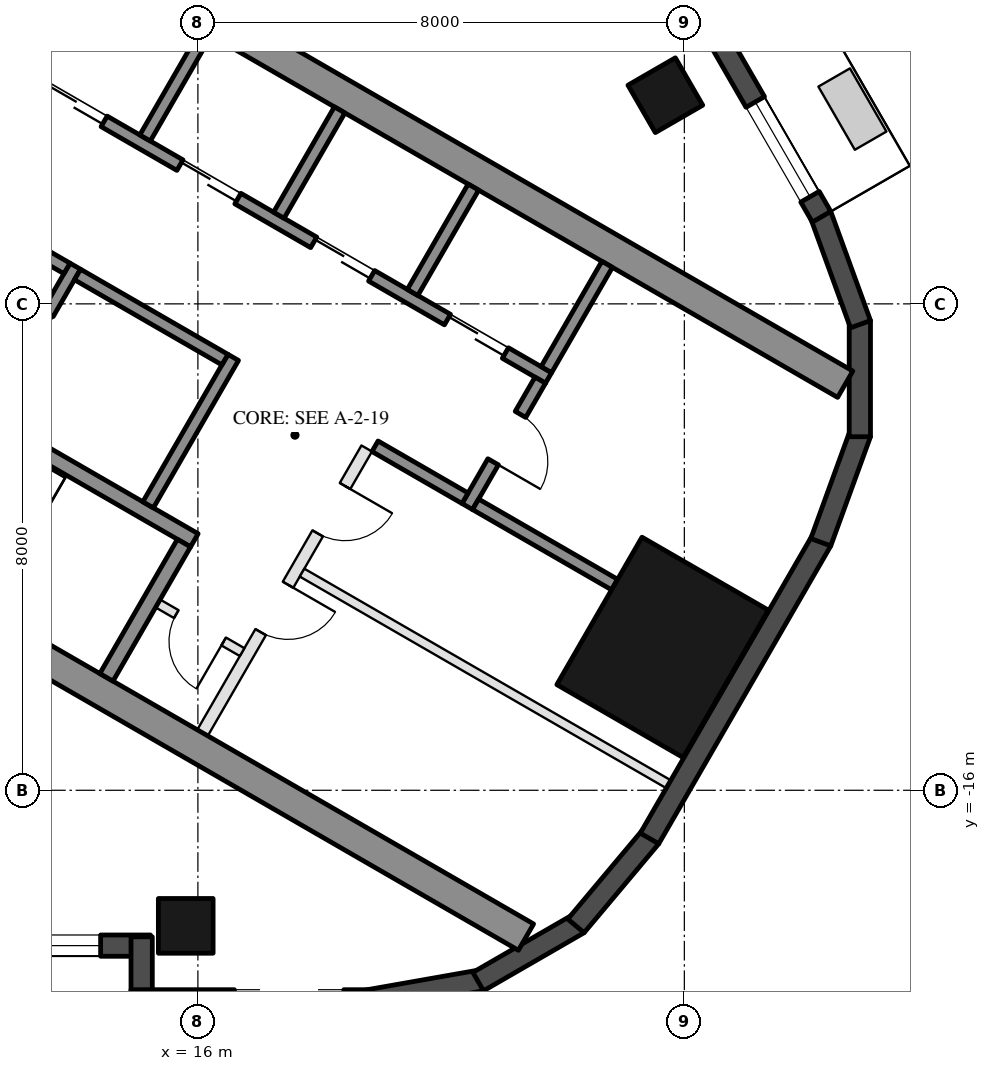
"""IFC4 building model, lengths in metres.
Left out: names, types, materials, properties, quantities, classifications, styles, units other than length and angle.
Written with IfcOpenShell. Run it as: python <this file> out.ifc"""

import sys

from ifc_helpers import new_model, si_unit, direction, frame, frame_2d, origin, origin_2d, place, context, subcontext, project, spatial, rectangle, hollow_rectangle, extrude, element, fill, save


model = new_model("IFC4")
c1 = context("Model", 3, precision=1e-05, world=origin(), true_north=direction((0.0, 1.0)))
c2 = subcontext(c1, "Body", "Model", "MODEL_VIEW")
j1 = project(units=[si_unit("LENGTHUNIT", "METRE"), si_unit("PLANEANGLEUNIT", "RADIAN")], contexts=[c1])
p1 = place(None, origin())
s1 = spatial("IfcSite", under=j1, at=p1, CompositionType="ELEMENT")
p2 = place(p1, origin())
s2 = spatial("IfcBuilding", under=s1, at=p2, CompositionType="ELEMENT")
p3 = place(p2, frame((0.0, 0.0, 90.9)))
s3 = spatial("IfcBuildingStorey", under=s2, at=p3, CompositionType="ELEMENT", Elevation=90.9)
for number, where, z_axis, x_axis in (
    (1, (15.8, -18.23, 0.0), (0.0, 0.0, 1.0), (-1.0, 0.0, 0.0)),
    (2, (23.688, -4.568, 0.0), (0.0, 0.0, 1.0), (-0.5, 0.866, 0.0)),
):
    element("IfcColumn", number, at=place(p3, frame(where, z_axis=z_axis, x_axis=x_axis)), inside=s3, PredefinedType="COLUMN", context=c2, shape_type="SweptSolid", body=[
        extrude(hollow_rectangle(XDim=0.9, YDim=0.9, WallThickness=0.04, at=origin_2d()), origin(), (0.0, 0.0, 1.0), 3.7),
    ])
p4 = place(p3, frame((23.643, -13.65, 0.0), z_axis=(0.0, 0.0, 1.0), x_axis=(0.5, 0.866025403784, 0.0)))
e3 = element("IfcColumn", 3, at=p4, inside=s3, PredefinedType="COLUMN", context=c2, shape_type="SweptSolid", body=[
    extrude(hollow_rectangle(XDim=2.8, YDim=2.4, WallThickness=0.07, at=origin_2d()), origin(), (0.0, 0.0, 1.0), 3.7),
])
p5 = place(p3, frame((8.48, -18.555, 0.0), z_axis=(0.0, 0.0, 1.0), x_axis=(1.0, 0.0, 0.0)))
e4 = element("IfcWall", 4, at=p5, inside=s3, PredefinedType="SOLIDWALL", context=c2, shape_type="SweptSolid", body=[
    extrude(rectangle(XDim=6.74, YDim=0.35, at=frame_2d((3.37, 0.0))), origin(), (0.0, 0.0, 1.0), 3.55),
])
p6 = place(p5, frame((0.32, 0.0, 0.0)))
e5 = element("IfcOpeningElement", 5, at=p6, cuts=e4, PredefinedType="OPENING", context=c2, shape_type="SweptSolid", body=[
    extrude(rectangle(XDim=2.4, YDim=2.4, at=frame_2d((1.2, 1.2))), frame((0.0, 0.185, 0.0), z_axis=(0.0, -1.0, 0.0), x_axis=(1.0, 0.0, 0.0)), (0.0, 0.0, 1.0), 0.37),
])
p7 = place(p5, frame((3.02, 0.0, 0.3)))
e6 = element("IfcOpeningElement", 6, at=p7, cuts=e4, PredefinedType="OPENING", context=c2, shape_type="SweptSolid", body=[
    extrude(rectangle(XDim=2.9, YDim=2.65, at=frame_2d((1.45, 1.325))), frame((0.0, 0.185, 0.0), z_axis=(0.0, -1.0, 0.0), x_axis=(1.0, 0.0, 0.0)), (0.0, 0.0, 1.0), 0.37),
])
p8 = place(p3, frame((15.075, -18.41, 0.0), z_axis=(0.0, 0.0, 1.0), x_axis=(0.0, -1.0, 0.0)))
e7 = element("IfcWall", 7, at=p8, inside=s3, PredefinedType="SOLIDWALL", context=c2, shape_type="SweptSolid", body=[
    extrude(rectangle(XDim=1.22, YDim=0.35, at=frame_2d((0.61, 0.0))), origin(), (0.0, 0.0, 1.0), 3.55),
])
p9 = place(p3, frame((14.9, -19.455, 0.0), z_axis=(0.0, 0.0, 1.0), x_axis=(1.0, 0.0, 0.0)))
e8 = element("IfcWall", 8, at=p9, inside=s3, PredefinedType="SOLIDWALL", context=c2, shape_type="SweptSolid", body=[
    extrude(rectangle(XDim=3.916, YDim=0.35, at=frame_2d((1.958, 0.0))), origin(), (0.0, 0.0, 1.0), 3.55),
])
p10 = place(p9, frame((1.7, 0.0, 0.3)))
e9 = element("IfcOpeningElement", 9, at=p10, cuts=e8, PredefinedType="OPENING", context=c2, shape_type="SweptSolid", body=[
    extrude(rectangle(XDim=1.8, YDim=2.65, at=frame_2d((0.9, 1.325))), frame((0.0, 0.185, 0.0), z_axis=(0.0, -1.0, 0.0), x_axis=(1.0, 0.0, 0.0)), (0.0, 0.0, 1.0), 0.37),
])
p11 = place(p3, frame((18.785, -19.458, 0.0), z_axis=(0.0, 0.0, 1.0), x_axis=(0.984798995425, 0.173697837091, 0.0)))
e10 = element("IfcWall", 10, at=p11, inside=s3, PredefinedType="SOLIDWALL", context=c2, shape_type="SweptSolid", body=[
    extrude(rectangle(XDim=1.91, YDim=0.35, at=frame_2d((0.955, 0.0))), origin(), (0.0, 0.0, 1.0), 3.55),
])
for number, where, z_axis, x_axis in (
    (11, (20.61, -19.147, 0.0), (0.0, 0.0, 1.0), (0.866, 0.5, 0.0)),
    (12, (22.217, -18.231, 0.0), (0.0, 0.0, 1.0), (0.643, 0.766, 0.0)),
):
    element("IfcWall", number, at=place(p3, frame(where, z_axis=z_axis, x_axis=x_axis)), inside=s3, PredefinedType="SOLIDWALL", context=c2, shape_type="SweptSolid", body=[
        extrude(rectangle(XDim=1.91, YDim=0.35, at=frame_2d((0.955, 0.0))), origin(), (0.0, 0.0, 1.0), 3.55),
    ])
p12 = place(p3, frame((23.427, -16.792, 0.0), z_axis=(0.0, 0.0, 1.0), x_axis=(0.500018773155, 0.866014564827, 0.0)))
e13 = element("IfcWall", 13, at=p12, inside=s3, PredefinedType="SOLIDWALL", context=c2, shape_type="SweptSolid", body=[
    extrude(rectangle(XDim=5.658, YDim=0.35, at=frame_2d((2.829, 0.0))), origin(), (0.0, 0.0, 1.0), 3.55),
])
for number, where, z_axis, x_axis in (
    (14, (26.244, -11.92, 0.0), (0.0, 0.0, 1.0), (0.342, 0.94, 0.0)),
    (15, (26.886, -10.185, 0.0), (0.0, 0.0, 1.0), (0.0, 1.0, 0.0)),
    (16, (26.897, -8.335, 0.0), (0.0, 0.0, 1.0), (-0.342, 0.94, 0.0)),
):
    element("IfcWall", number, at=place(p3, frame(where, z_axis=z_axis, x_axis=x_axis)), inside=s3, PredefinedType="SOLIDWALL", context=c2, shape_type="SweptSolid", body=[
        extrude(rectangle(XDim=1.91, YDim=0.35, at=frame_2d((0.955, 0.0))), origin(), (0.0, 0.0, 1.0), 3.55),
    ])
p13 = place(p3, frame((26.257, -6.567, 0.0), z_axis=(0.0, 0.0, 1.0), x_axis=(-0.500023526245, 0.866011820475, 0.0)))
e17 = element("IfcWall", 17, at=p13, inside=s3, PredefinedType="SOLIDWALL", context=c2, shape_type="SweptSolid", body=[
    extrude(rectangle(XDim=11.816, YDim=0.35, at=frame_2d((5.908, 0.0))), origin(), (0.0, 0.0, 1.0), 3.55),
])
p14 = place(p13, frame((0.38, 0.0, 0.3)))
e18 = element("IfcOpeningElement", 18, at=p14, cuts=e17, PredefinedType="OPENING", context=c2, shape_type="SweptSolid", body=[
    extrude(rectangle(XDim=1.8, YDim=2.65, at=frame_2d((0.9, 1.325))), frame((0.0, 0.185, 0.0), z_axis=(0.0, -1.0, 0.0), x_axis=(1.0, 0.0, 0.0)), (0.0, 0.0, 1.0), 0.37),
])
p15 = place(p13, frame((7.716, 0.0, 0.0)))
e19 = element("IfcOpeningElement", 19, at=p15, cuts=e17, PredefinedType="OPENING", context=c2, shape_type="SweptSolid", body=[
    extrude(rectangle(XDim=2.4, YDim=2.4, at=frame_2d((1.2, 1.2))), frame((0.0, 0.185, 0.0), z_axis=(0.0, -1.0, 0.0), x_axis=(1.0, 0.0, 0.0)), (0.0, 0.0, 1.0), 0.37),
])
p16 = place(p13, frame((3.816, 0.0, 0.3)))
e20 = element("IfcOpeningElement", 20, at=p16, cuts=e17, PredefinedType="OPENING", context=c2, shape_type="SweptSolid", body=[
    extrude(rectangle(XDim=1.6, YDim=2.65, at=frame_2d((0.8, 1.325))), frame((0.0, 0.185, 0.0), z_axis=(0.0, -1.0, 0.0), x_axis=(1.0, 0.0, 0.0)), (0.0, 0.0, 1.0), 0.37),
])
p17 = place(p13, frame((5.716, 0.0, 0.3)))
e21 = element("IfcOpeningElement", 21, at=p17, cuts=e17, PredefinedType="OPENING", context=c2, shape_type="SweptSolid", body=[
    extrude(rectangle(XDim=1.6, YDim=2.65, at=frame_2d((0.8, 1.325))), frame((0.0, 0.185, 0.0), z_axis=(0.0, -1.0, 0.0), x_axis=(1.0, 0.0, 0.0)), (0.0, 0.0, 1.0), 0.37),
])
for number, where, z_axis, x_axis in (
    (22, (8.547, -10.997, 0.0), (0.0, 0.0, 1.0), (0.866, -0.5, 0.0)),
    (23, (13.797, -1.903, 0.0), (0.0, 0.0, 1.0), (0.866, -0.5, 0.0)),
):
    element("IfcWall", number, at=place(p3, frame(where, z_axis=z_axis, x_axis=x_axis)), inside=s3, PredefinedType="SHEAR", context=c2, shape_type="SweptSolid", body=[
        extrude(rectangle(XDim=14.837, YDim=0.5, at=frame_2d((7.418, 0.0))), origin(), (0.0, 0.0, 1.0), 3.5),
    ])
p18 = place(p3, frame((8.845, -10.88, 0.0), z_axis=(0.0, 0.0, 1.0), x_axis=(0.500004234368, 0.866022959057, 0.0)))
e24 = element("IfcWall", 24, at=p18, inside=s3, PredefinedType="SHEAR", context=c2, shape_type="SweptSolid", body=[
    extrude(rectangle(XDim=10.0, YDim=0.4, at=frame_2d((5.0, 0.0))), origin(), (0.0, 0.0, 1.0), 3.5),
])
p19 = place(p18, frame((3.55, 0.0, 0.0)))
e25 = element("IfcOpeningElement", 25, at=p19, cuts=e24, PredefinedType="OPENING", context=c2, shape_type="SweptSolid", body=[
    extrude(rectangle(XDim=1.1, YDim=2.1, at=frame_2d((0.55, 1.05))), frame((0.0, 0.21, 0.0), z_axis=(0.0, -1.0, 0.0), x_axis=(1.0, 0.0, 0.0)), (0.0, 0.0, 1.0), 0.42),
])
p20 = place(p18, frame((5.85, 0.0, 0.0)))
e26 = element("IfcOpeningElement", 26, at=p20, cuts=e24, PredefinedType="OPENING", context=c2, shape_type="SweptSolid", body=[
    extrude(rectangle(XDim=1.4, YDim=2.1, at=frame_2d((0.7, 1.05))), frame((0.0, 0.21, 0.0), z_axis=(0.0, -1.0, 0.0), x_axis=(1.0, 0.0, 0.0)), (0.0, 0.0, 1.0), 0.42),
])
p21 = place(p3, frame((10.356, -8.664, 0.0), z_axis=(0.0, 0.0, 1.0), x_axis=(0.866028629588, -0.499994412703, 0.0)))
e27 = element("IfcWall", 27, at=p21, inside=s3, PredefinedType="SHEAR", context=c2, shape_type="SweptSolid", body=[
    extrude(rectangle(XDim=6.45, YDim=0.25, at=frame_2d((3.225, 0.0))), origin(), (0.0, 0.0, 1.0), 3.5),
])
p22 = place(p21, frame((0.3, 0.0, 0.0)))
e28 = element("IfcOpeningElement", 28, at=p22, cuts=e27, PredefinedType="OPENING", context=c2, shape_type="SweptSolid", body=[
    extrude(rectangle(XDim=1.0, YDim=2.1, at=frame_2d((0.5, 1.05))), frame((0.0, 0.135, 0.0), z_axis=(0.0, -1.0, 0.0), x_axis=(1.0, 0.0, 0.0)), (0.0, 0.0, 1.0), 0.27),
])
p23 = place(p3, frame((14.496, -14.143, 0.0), z_axis=(0.0, 0.0, 1.0), x_axis=(0.500062241894, 0.865989465428, 0.0)))
e29 = element("IfcWall", 29, at=p23, inside=s3, PredefinedType="SHEAR", context=c2, shape_type="SweptSolid", body=[
    extrude(rectangle(XDim=2.55, YDim=0.25, at=frame_2d((1.275, 0.0))), origin(), (0.0, 0.0, 1.0), 3.5),
])
p24 = place(p3, frame((15.181, -11.305, 0.0), z_axis=(0.0, 0.0, 1.0), x_axis=(0.49994636267, 0.866056369097, 0.0)))
e30 = element("IfcWall", 30, at=p24, inside=s3, PredefinedType="SHEAR", context=c2, shape_type="SweptSolid", body=[
    extrude(rectangle(XDim=2.8, YDim=0.2, at=frame_2d((1.4, 0.0))), origin(), (0.0, 0.0, 1.0), 3.5),
])
p25 = place(p3, frame((12.583, -9.805, 0.0), z_axis=(0.0, 0.0, 1.0), x_axis=(0.49994636267, 0.866056369097, 0.0)))
e31 = element("IfcWall", 31, at=p25, inside=s3, PredefinedType="SHEAR", context=c2, shape_type="SweptSolid", body=[
    extrude(rectangle(XDim=2.8, YDim=0.2, at=frame_2d((1.4, 0.0))), origin(), (0.0, 0.0, 1.0), 3.5),
])
p26 = place(p25, frame((0.7, 0.0, 0.0)))
e32 = element("IfcOpeningElement", 32, at=p26, cuts=e31, PredefinedType="OPENING", context=c2, shape_type="SweptSolid", body=[
    extrude(rectangle(XDim=1.2, YDim=2.1, at=frame_2d((0.6, 1.05))), frame((0.0, 0.11, 0.0), z_axis=(0.0, -1.0, 0.0), x_axis=(1.0, 0.0, 0.0)), (0.0, 0.0, 1.0), 0.22),
])
p27 = place(p3, frame((11.768, -6.217, 0.0), z_axis=(0.0, 0.0, 1.0), x_axis=(0.866050077142, -0.499957262057, 0.0)))
e33 = element("IfcWall", 33, at=p27, inside=s3, PredefinedType="SHEAR", context=c2, shape_type="SweptSolid", body=[
    extrude(rectangle(XDim=2.4, YDim=0.2, at=frame_2d((1.2, 0.0))), origin(), (0.0, 0.0, 1.0), 3.5),
])
p28 = place(p3, frame((14.02, -7.517, 0.0), z_axis=(0.0, 0.0, 1.0), x_axis=(0.866034573852, -0.49998411664, 0.0)))
e34 = element("IfcWall", 34, at=p28, inside=s3, PredefinedType="SHEAR", context=c2, shape_type="SweptSolid", body=[
    extrude(rectangle(XDim=2.8, YDim=0.2, at=frame_2d((1.4, 0.0))), origin(), (0.0, 0.0, 1.0), 3.5),
])
p29 = place(p3, frame((12.968, -4.138, 0.0), z_axis=(0.0, 0.0, 1.0), x_axis=(0.866028328073, -0.49999493495, 0.0)))
e35 = element("IfcWall", 35, at=p29, inside=s3, PredefinedType="SHEAR", context=c2, shape_type="SweptSolid", body=[
    extrude(rectangle(XDim=10.16, YDim=0.2, at=frame_2d((5.08, 0.0))), origin(), (0.0, 0.0, 1.0), 3.5),
])
p30 = place(p29, frame((0.62, 0.0, 0.0)))
e36 = element("IfcOpeningElement", 36, at=p30, cuts=e35, PredefinedType="OPENING", context=c2, shape_type="SweptSolid", body=[
    extrude(rectangle(XDim=1.1, YDim=2.1, at=frame_2d((0.55, 1.05))), frame((0.0, 0.11, 0.0), z_axis=(0.0, -1.0, 0.0), x_axis=(1.0, 0.0, 0.0)), (0.0, 0.0, 1.0), 0.22),
])
p31 = place(p29, frame((3.16, 0.0, 0.0)))
e37 = element("IfcOpeningElement", 37, at=p31, cuts=e35, PredefinedType="OPENING", context=c2, shape_type="SweptSolid", body=[
    extrude(rectangle(XDim=1.1, YDim=2.1, at=frame_2d((0.55, 1.05))), frame((0.0, 0.11, 0.0), z_axis=(0.0, -1.0, 0.0), x_axis=(1.0, 0.0, 0.0)), (0.0, 0.0, 1.0), 0.22),
])
p32 = place(p29, frame((5.7, 0.0, 0.0)))
e38 = element("IfcOpeningElement", 38, at=p32, cuts=e35, PredefinedType="OPENING", context=c2, shape_type="SweptSolid", body=[
    extrude(rectangle(XDim=1.1, YDim=2.1, at=frame_2d((0.55, 1.05))), frame((0.0, 0.11, 0.0), z_axis=(0.0, -1.0, 0.0), x_axis=(1.0, 0.0, 0.0)), (0.0, 0.0, 1.0), 0.22),
])
p33 = place(p29, frame((8.24, 0.0, 0.0)))
e39 = element("IfcOpeningElement", 39, at=p33, cuts=e35, PredefinedType="OPENING", context=c2, shape_type="SweptSolid", body=[
    extrude(rectangle(XDim=1.1, YDim=2.1, at=frame_2d((0.55, 1.05))), frame((0.0, 0.11, 0.0), z_axis=(0.0, -1.0, 0.0), x_axis=(1.0, 0.0, 0.0)), (0.0, 0.0, 1.0), 0.22),
])
p34 = place(p3, frame((20.43, -11.333, 0.0), z_axis=(0.0, 0.0, 1.0), x_axis=(0.500001309137, 0.866024647952, 0.0)))
e40 = element("IfcWall", 40, at=p34, inside=s3, PredefinedType="SHEAR", context=c2, shape_type="SweptSolid", body=[
    extrude(rectangle(XDim=2.4, YDim=0.2, at=frame_2d((1.2, 0.0))), origin(), (0.0, 0.0, 1.0), 3.5),
])
p35 = place(p34, frame((0.85, 0.0, 0.0)))
e41 = element("IfcOpeningElement", 41, at=p35, cuts=e40, PredefinedType="OPENING", context=c2, shape_type="SweptSolid", body=[
    extrude(rectangle(XDim=0.9, YDim=2.1, at=frame_2d((0.45, 1.05))), frame((0.0, 0.11, 0.0), z_axis=(0.0, -1.0, 0.0), x_axis=(1.0, 0.0, 0.0)), (0.0, 0.0, 1.0), 0.22),
])
p36 = place(p3, frame((18.913, -10.342, 0.0), z_axis=(0.0, 0.0, 1.0), x_axis=(0.866038183914, -0.499977863513, 0.0)))
e42 = element("IfcWall", 42, at=p36, inside=s3, PredefinedType="SHEAR", context=c2, shape_type="SweptSolid", body=[
    extrude(rectangle(XDim=1.71, YDim=0.2, at=frame_2d((0.855, 0.0))), origin(), (0.0, 0.0, 1.0), 3.5),
])
for number, where, z_axis, x_axis in (
    (43, (15.131, -5.272, 0.0), (0.0, 0.0, 1.0), (0.5, 0.866, 0.0)),
    (44, (17.331, -6.542, 0.0), (0.0, 0.0, 1.0), (0.5, 0.866, 0.0)),
    (45, (19.531, -7.812, 0.0), (0.0, 0.0, 1.0), (0.5, 0.866, 0.0)),
    (46, (21.73, -9.082, 0.0), (0.0, 0.0, 1.0), (0.5, 0.866, 0.0)),
):
    element("IfcWall", number, at=place(p3, frame(where, z_axis=z_axis, x_axis=x_axis)), inside=s3, PredefinedType="SHEAR", context=c2, shape_type="SweptSolid", body=[
        extrude(rectangle(XDim=2.0, YDim=0.2, at=frame_2d((1.0, 0.0))), origin(), (0.0, 0.0, 1.0), 3.5),
    ])
p37 = place(p3, frame((20.567, -11.297, 0.0), z_axis=(0.0, 0.0, 1.0), x_axis=(0.866060851709, -0.499938597367, 0.0)))
e47 = element("IfcWall", 47, at=p37, inside=s3, PredefinedType="SHEAR", context=c2, shape_type="SweptSolid", body=[
    extrude(rectangle(XDim=2.64, YDim=0.2, at=frame_2d((1.32, 0.0))), origin(), (0.0, 0.0, 1.0), 3.5),
])
p38 = place(p3, frame((16.076, -15.055, 0.0), z_axis=(0.0, 0.0, 1.0), x_axis=(0.499995103361, 0.866028230842, 0.0)))
e48 = element("IfcWall", 48, at=p38, inside=s3, PredefinedType="PARTITIONING", context=c2, shape_type="SweptSolid", body=[
    extrude(rectangle(XDim=5.4, YDim=0.2, at=frame_2d((2.7, 0.0))), origin(), (0.0, 0.0, 1.0), 3.5),
])
p39 = place(p38, frame((1.913, 0.0, 0.0)))
e49 = element("IfcOpeningElement", 49, at=p39, cuts=e48, PredefinedType="OPENING", context=c2, shape_type="SweptSolid", body=[
    extrude(rectangle(XDim=0.9, YDim=2.1, at=frame_2d((0.45, 1.05))), frame((0.0, 0.11, 0.0), z_axis=(0.0, -1.0, 0.0), x_axis=(1.0, 0.0, 0.0)), (0.0, 0.0, 1.0), 0.22),
])
p40 = place(p38, frame((3.788, 0.0, 0.0)))
e50 = element("IfcOpeningElement", 50, at=p40, cuts=e48, PredefinedType="OPENING", context=c2, shape_type="SweptSolid", body=[
    extrude(rectangle(XDim=0.9, YDim=2.1, at=frame_2d((0.45, 1.05))), frame((0.0, 0.11, 0.0), z_axis=(0.0, -1.0, 0.0), x_axis=(1.0, 0.0, 0.0)), (0.0, 0.0, 1.0), 0.22),
])
p41 = place(p3, frame((15.342, -12.928, 0.0), z_axis=(0.0, 0.0, 1.0), x_axis=(0.865989903783, -0.500061482766, 0.0)))
e51 = element("IfcWall", 51, at=p41, inside=s3, PredefinedType="PARTITIONING", context=c2, shape_type="SweptSolid", body=[
    extrude(rectangle(XDim=1.6, YDim=0.15, at=frame_2d((0.8, 0.0))), origin(), (0.0, 0.0, 1.0), 3.5),
])
p42 = place(p41, frame((0.35, 0.0, 0.0)))
e52 = element("IfcOpeningElement", 52, at=p42, cuts=e51, PredefinedType="OPENING", context=c2, shape_type="SweptSolid", body=[
    extrude(rectangle(XDim=0.9, YDim=2.1, at=frame_2d((0.45, 1.05))), frame((0.0, 0.085, 0.0), z_axis=(0.0, -1.0, 0.0), x_axis=(1.0, 0.0, 0.0)), (0.0, 0.0, 1.0), 0.17),
])
p43 = place(p3, frame((17.713, -12.42, 0.0), z_axis=(0.0, 0.0, 1.0), x_axis=(0.866016523273, -0.500015381182, 0.0)))
e53 = element("IfcWall", 53, at=p43, inside=s3, PredefinedType="PARTITIONING", context=c2, shape_type="SweptSolid", body=[
    extrude(rectangle(XDim=6.95, YDim=0.15, at=frame_2d((3.475, 0.0))), origin(), (0.0, 0.0, 1.0), 3.5),
])
p44 = place(p7, origin())
e54 = element("IfcWindow", 54, at=p44, inside=s3, PartitioningType="SINGLE_PANEL", PredefinedType="WINDOW", context=c2, shape_type="SweptSolid", body=[
    extrude(rectangle(XDim=2.9, YDim=2.65, at=frame_2d((1.45, 1.325))), frame((0.0, 0.03, 0.0), z_axis=(0.0, -1.0, 0.0), x_axis=(1.0, 0.0, 0.0)), (0.0, 0.0, 1.0), 0.06),
])
fill(e6, e54)
p45 = place(p14, origin())
e55 = element("IfcWindow", 55, at=p45, inside=s3, PartitioningType="SINGLE_PANEL", PredefinedType="WINDOW", context=c2, shape_type="SweptSolid", body=[
    extrude(rectangle(XDim=1.8, YDim=2.65, at=frame_2d((0.9, 1.325))), frame((0.0, 0.03, 0.0), z_axis=(0.0, -1.0, 0.0), x_axis=(1.0, 0.0, 0.0)), (0.0, 0.0, 1.0), 0.06),
])
fill(e18, e55)
p46 = place(p42, frame((0.9, 0.0, 0.0), z_axis=(0.0, 0.0, 1.0), x_axis=(-1.0, 0.0, 0.0)))
e56 = element("IfcDoor", 56, at=p46, inside=s3, OperationType="SINGLE_SWING_LEFT", PredefinedType="DOOR", context=c2, shape_type="SweptSolid", body=[
    extrude(rectangle(XDim=0.9, YDim=2.1, at=frame_2d((0.45, 1.05))), frame((0.0, 0.025, 0.0), z_axis=(0.0, -1.0, 0.0), x_axis=(1.0, 0.0, 0.0)), (0.0, 0.0, 1.0), 0.05),
])
fill(e52, e56)
p47 = place(p30, origin())
e57 = element("IfcDoor", 57, at=p47, inside=s3, OperationType="DOUBLE_DOOR_SLIDING", PredefinedType="DOOR", context=c2, shape_type="SweptSolid", body=[
    extrude(rectangle(XDim=1.1, YDim=2.1, at=frame_2d((0.55, 1.05))), frame((0.0, 0.025, 0.0), z_axis=(0.0, -1.0, 0.0), x_axis=(1.0, 0.0, 0.0)), (0.0, 0.0, 1.0), 0.05),
])
fill(e36, e57)
p48 = place(p31, origin())
e58 = element("IfcDoor", 58, at=p48, inside=s3, OperationType="DOUBLE_DOOR_SLIDING", PredefinedType="DOOR", context=c2, shape_type="SweptSolid", body=[
    extrude(rectangle(XDim=1.1, YDim=2.1, at=frame_2d((0.55, 1.05))), frame((0.0, 0.025, 0.0), z_axis=(0.0, -1.0, 0.0), x_axis=(1.0, 0.0, 0.0)), (0.0, 0.0, 1.0), 0.05),
])
fill(e37, e58)
p49 = place(p32, origin())
e59 = element("IfcDoor", 59, at=p49, inside=s3, OperationType="DOUBLE_DOOR_SLIDING", PredefinedType="DOOR", context=c2, shape_type="SweptSolid", body=[
    extrude(rectangle(XDim=1.1, YDim=2.1, at=frame_2d((0.55, 1.05))), frame((0.0, 0.025, 0.0), z_axis=(0.0, -1.0, 0.0), x_axis=(1.0, 0.0, 0.0)), (0.0, 0.0, 1.0), 0.05),
])
fill(e38, e59)
p50 = place(p33, origin())
e60 = element("IfcDoor", 60, at=p50, inside=s3, OperationType="DOUBLE_DOOR_SLIDING", PredefinedType="DOOR", context=c2, shape_type="SweptSolid", body=[
    extrude(rectangle(XDim=1.1, YDim=2.1, at=frame_2d((0.55, 1.05))), frame((0.0, 0.025, 0.0), z_axis=(0.0, -1.0, 0.0), x_axis=(1.0, 0.0, 0.0)), (0.0, 0.0, 1.0), 0.05),
])
fill(e39, e60)
p51 = place(p35, frame((0.9, 0.0, 0.0), z_axis=(0.0, 0.0, 1.0), x_axis=(-1.0, 0.0, 0.0)))
e61 = element("IfcDoor", 61, at=p51, inside=s3, OperationType="SINGLE_SWING_RIGHT", PredefinedType="DOOR", context=c2, shape_type="SweptSolid", body=[
    extrude(rectangle(XDim=0.9, YDim=2.1, at=frame_2d((0.45, 1.05))), frame((0.0, 0.025, 0.0), z_axis=(0.0, -1.0, 0.0), x_axis=(1.0, 0.0, 0.0)), (0.0, 0.0, 1.0), 0.05),
])
fill(e41, e61)
p52 = place(p39, frame((0.9, 0.0, 0.0), z_axis=(0.0, 0.0, 1.0), x_axis=(-1.0, 0.0, 0.0)))
e62 = element("IfcDoor", 62, at=p52, inside=s3, OperationType="SINGLE_SWING_LEFT", PredefinedType="DOOR", context=c2, shape_type="SweptSolid", body=[
    extrude(rectangle(XDim=0.9, YDim=2.1, at=frame_2d((0.45, 1.05))), frame((0.0, 0.025, 0.0), z_axis=(0.0, -1.0, 0.0), x_axis=(1.0, 0.0, 0.0)), (0.0, 0.0, 1.0), 0.05),
])
fill(e49, e62)
p53 = place(p40, frame((0.9, 0.0, 0.0), z_axis=(0.0, 0.0, 1.0), x_axis=(-1.0, 0.0, 0.0)))
e63 = element("IfcDoor", 63, at=p53, inside=s3, OperationType="SINGLE_SWING_LEFT", PredefinedType="DOOR", context=c2, shape_type="SweptSolid", body=[
    extrude(rectangle(XDim=0.9, YDim=2.1, at=frame_2d((0.45, 1.05))), frame((0.0, 0.025, 0.0), z_axis=(0.0, -1.0, 0.0), x_axis=(1.0, 0.0, 0.0)), (0.0, 0.0, 1.0), 0.05),
])
fill(e50, e63)
save(model, sys.argv[1])
